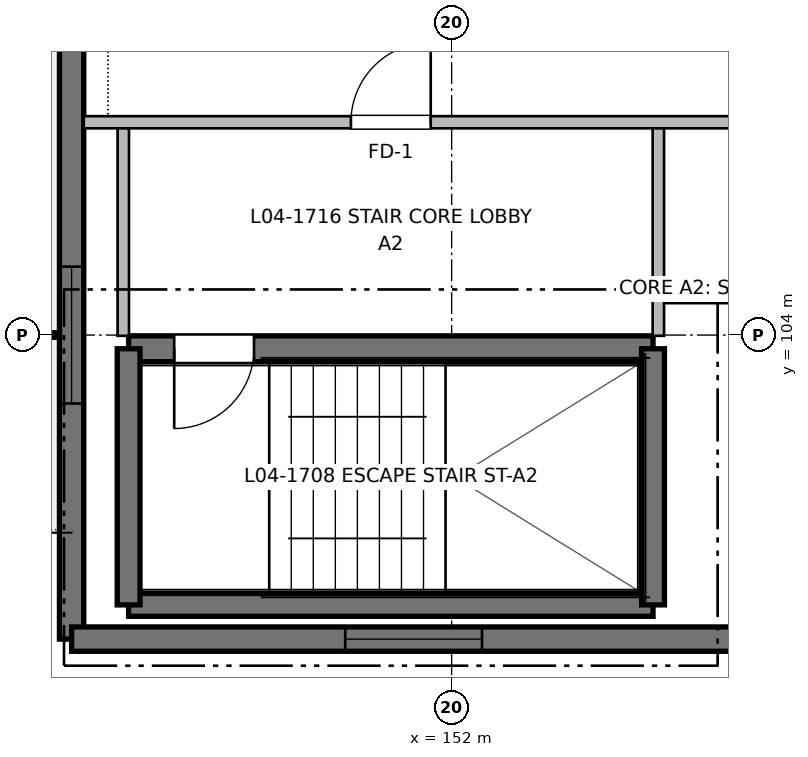
"""IFC4 building model, lengths in metres.
Left out: names, types, materials, properties, quantities, classifications, styles, units other than length and angle.
Written with IfcOpenShell. Run it as: python <this file> out.ifc"""

import sys

from ifc_helpers import new_model, si_unit, direction, frame, frame_2d, origin, place, context, subcontext, project, spatial, rectangle, extrude, element, fill, save


model = new_model("IFC4")
c1 = context("Model", 3, precision=1e-05, world=origin(), true_north=direction((0.0, 1.0)))
c2 = subcontext(c1, "Body", "Model", "MODEL_VIEW")
j1 = project(units=[si_unit("LENGTHUNIT", "METRE"), si_unit("PLANEANGLEUNIT", "RADIAN")], contexts=[c1])
p1 = place(None, origin())
s1 = spatial("IfcSite", under=j1, at=p1, CompositionType="ELEMENT")
p2 = place(p1, origin())
s2 = spatial("IfcBuilding", under=s1, at=p2, CompositionType="ELEMENT")
p3 = place(p2, frame((0.0, 0.0, 13.76)))
s3 = spatial("IfcBuildingStorey", under=s2, at=p3, CompositionType="ELEMENT", Elevation=13.76)
p4 = place(p3, frame((147.75, 100.45, 0.0), z_axis=(0.0, 0.0, 1.0), x_axis=(1.0, 0.0, 0.0)))
e1 = element("IfcWall", 1, at=p4, inside=s3, PredefinedType="SHEAR", context=c2, shape_type="SweptSolid", body=[
    extrude(rectangle(XDim=6.9, YDim=0.3, at=frame_2d((3.45, 0.0))), origin(), (0.0, 0.0, 1.0), 3.2),
])
p5 = place(p3, frame((154.65, 103.82, 0.0), z_axis=(0.0, 0.0, 1.0), x_axis=(-1.0, 0.0, 0.0)))
e2 = element("IfcWall", 2, at=p5, inside=s3, PredefinedType="SHEAR", context=c2, shape_type="SweptSolid", body=[
    extrude(rectangle(XDim=6.9, YDim=0.34, at=frame_2d((3.45, 0.0))), origin(), (0.0, 0.0, 1.0), 3.2),
])
p6 = place(p5, frame((5.25, 0.0, 0.0)))
e3 = element("IfcOpeningElement", 3, at=p6, cuts=e2, PredefinedType="OPENING", context=c2, shape_type="SweptSolid", body=[
    extrude(rectangle(XDim=1.05, YDim=2.15, at=frame_2d((0.525, 1.075))), frame((0.0, 0.18, 0.0), z_axis=(0.0, -1.0, 0.0), x_axis=(1.0, 0.0, 0.0)), (0.0, 0.0, 1.0), 0.36),
])
for number, where, z_axis, x_axis in (
    (4, (147.75, 103.82, 0.0), (0.0, 0.0, 1.0), (0.0, -1.0, 0.0)),
    (5, (154.65, 100.45, 0.0), (0.0, 0.0, 1.0), (0.0, 1.0, 0.0)),
):
    element("IfcWall", number, at=place(p3, frame(where, z_axis=z_axis, x_axis=x_axis)), inside=s3, PredefinedType="SHEAR", context=c2, shape_type="SweptSolid", body=[
        extrude(rectangle(XDim=3.37, YDim=0.3, at=frame_2d((1.685, 0.0))), origin(), (0.0, 0.0, 1.0), 3.2),
    ])
p7 = place(p3, frame((147.0, 100.0, 0.0), z_axis=(0.0, 0.0, 1.0), x_axis=(0.0, 1.0, 0.0)))
e6 = element("IfcWall", 6, at=p7, inside=s3, PredefinedType="SHEAR", context=c2, shape_type="SweptSolid", body=[
    extrude(rectangle(XDim=16.0, YDim=0.32, at=frame_2d((8.0, 0.0))), origin(), (0.0, 0.0, 1.0), 2.98),
])
p8 = place(p7, frame((3.1, 0.0, 0.72)))
e7 = element("IfcOpeningElement", 7, at=p8, cuts=e6, PredefinedType="OPENING", context=c2, shape_type="SweptSolid", body=[
    extrude(rectangle(XDim=1.8, YDim=1.5, at=frame_2d((0.9, 0.75))), frame((0.0, 0.17, 0.0), z_axis=(0.0, -1.0, 0.0), x_axis=(1.0, 0.0, 0.0)), (0.0, 0.0, 1.0), 0.34),
])
p9 = place(p7, frame((11.85, 0.0, 0.0)))
e8 = element("IfcOpeningElement", 8, at=p9, cuts=e6, PredefinedType="OPENING", context=c2, shape_type="SweptSolid", body=[
    extrude(rectangle(XDim=1.2, YDim=2.2, at=frame_2d((0.6, 1.1))), frame((0.0, 0.17, 0.0), z_axis=(0.0, -1.0, 0.0), x_axis=(1.0, 0.0, 0.0)), (0.0, 0.0, 1.0), 0.34),
])
p10 = place(p3, frame((156.0, 100.0, 0.0), z_axis=(0.0, 0.0, 1.0), x_axis=(-1.0, 0.0, 0.0)))
e9 = element("IfcWall", 9, at=p10, inside=s3, PredefinedType="SHEAR", context=c2, shape_type="SweptSolid", body=[
    extrude(rectangle(XDim=9.0, YDim=0.32, at=frame_2d((4.5, 0.0))), origin(), (0.0, 0.0, 1.0), 2.98),
])
p11 = place(p10, frame((3.6, 0.0, 0.72)))
e10 = element("IfcOpeningElement", 10, at=p11, cuts=e9, PredefinedType="OPENING", context=c2, shape_type="SweptSolid", body=[
    extrude(rectangle(XDim=1.8, YDim=1.5, at=frame_2d((0.9, 0.75))), frame((0.0, 0.17, 0.0), z_axis=(0.0, -1.0, 0.0), x_axis=(1.0, 0.0, 0.0)), (0.0, 0.0, 1.0), 0.34),
])
p12 = place(p3, frame((147.16, 106.8, 0.0), z_axis=(0.0, 0.0, 1.0), x_axis=(1.0, 0.0, 0.0)))
e11 = element("IfcWall", 11, at=p12, inside=s3, PredefinedType="PARTITIONING", context=c2, shape_type="SweptSolid", body=[
    extrude(rectangle(XDim=27.64, YDim=0.16, at=frame_2d((13.82, 0.0))), origin(), (0.0, 0.0, 1.0), 2.935),
])
p13 = place(p12, frame((3.515, 0.0, 0.0)))
e12 = element("IfcOpeningElement", 12, at=p13, cuts=e11, PredefinedType="OPENING", context=c2, shape_type="SweptSolid", body=[
    extrude(rectangle(XDim=1.05, YDim=2.15, at=frame_2d((0.525, 1.075))), frame((0.0, 0.09, 0.0), z_axis=(0.0, -1.0, 0.0), x_axis=(1.0, 0.0, 0.0)), (0.0, 0.0, 1.0), 0.18),
])
p14 = place(p12, frame((10.69, 0.0, 0.0)))
e13 = element("IfcOpeningElement", 13, at=p14, cuts=e11, PredefinedType="OPENING", context=c2, shape_type="SweptSolid", body=[
    extrude(rectangle(XDim=0.98, YDim=2.15, at=frame_2d((0.49, 1.075))), frame((0.0, 0.09, 0.0), z_axis=(0.0, -1.0, 0.0), x_axis=(1.0, 0.0, 0.0)), (0.0, 0.0, 1.0), 0.18),
])
for number, where, z_axis, x_axis in (
    (14, (147.68, 103.99, 0.0), (0.0, 0.0, 1.0), (0.0, 1.0, 0.0)),
    (15, (154.72, 103.99, 0.0), (0.0, 0.0, 1.0), (0.0, 1.0, 0.0)),
):
    element("IfcWall", number, at=place(p3, frame(where, z_axis=z_axis, x_axis=x_axis)), inside=s3, PredefinedType="PARTITIONING", context=c2, shape_type="SweptSolid", body=[
        extrude(rectangle(XDim=2.73, YDim=0.15, at=frame_2d((1.365, 0.0))), origin(), (0.0, 0.0, 1.0), 2.935),
    ])
p15 = place(p3, frame((154.8, 104.47, 0.0), z_axis=(0.0, 0.0, 1.0), x_axis=(1.0, 0.0, 0.0)))
e16 = element("IfcWall", 16, at=p15, inside=s3, PredefinedType="PARTITIONING", context=c2, shape_type="SweptSolid", body=[
    extrude(rectangle(XDim=7.02, YDim=0.1, at=frame_2d((3.51, 0.0))), origin(), (0.0, 0.0, 1.0), 2.935),
])
p16 = place(p15, frame((2.974, 0.0, 0.0)))
e17 = element("IfcOpeningElement", 17, at=p16, cuts=e16, PredefinedType="OPENING", context=c2, shape_type="SweptSolid", body=[
    extrude(rectangle(XDim=0.92, YDim=2.1, at=frame_2d((0.46, 1.05))), frame((0.0, 0.06, 0.0), z_axis=(0.0, -1.0, 0.0), x_axis=(1.0, 0.0, 0.0)), (0.0, 0.0, 1.0), 0.12),
])
p17 = place(p6, origin())
e18 = element("IfcDoor", 18, at=p17, inside=s3, OperationType="SINGLE_SWING_RIGHT", PredefinedType="DOOR", context=c2, shape_type="SweptSolid", body=[
    extrude(rectangle(XDim=1.05, YDim=2.15, at=frame_2d((0.525, 1.075))), frame((0.0, 0.025, 0.0), z_axis=(0.0, -1.0, 0.0), x_axis=(1.0, 0.0, 0.0)), (0.0, 0.0, 1.0), 0.05),
])
fill(e3, e18)
p18 = place(p8, origin())
e19 = element("IfcWindow", 19, at=p18, inside=s3, PartitioningType="SINGLE_PANEL", PredefinedType="WINDOW", context=c2, shape_type="SweptSolid", body=[
    extrude(rectangle(XDim=1.8, YDim=1.5, at=frame_2d((0.9, 0.75))), frame((0.0, 0.03, 0.0), z_axis=(0.0, -1.0, 0.0), x_axis=(1.0, 0.0, 0.0)), (0.0, 0.0, 1.0), 0.06),
])
fill(e7, e19)
p19 = place(p11, origin())
e20 = element("IfcWindow", 20, at=p19, inside=s3, PartitioningType="SINGLE_PANEL", PredefinedType="WINDOW", context=c2, shape_type="SweptSolid", body=[
    extrude(rectangle(XDim=1.8, YDim=1.5, at=frame_2d((0.9, 0.75))), frame((0.0, 0.03, 0.0), z_axis=(0.0, -1.0, 0.0), x_axis=(1.0, 0.0, 0.0)), (0.0, 0.0, 1.0), 0.06),
])
fill(e10, e20)
p20 = place(p13, origin())
e21 = element("IfcDoor", 21, at=p20, inside=s3, OperationType="SINGLE_SWING_RIGHT", PredefinedType="DOOR", context=c2, shape_type="SweptSolid", body=[
    extrude(rectangle(XDim=1.05, YDim=2.15, at=frame_2d((0.525, 1.075))), frame((0.0, 0.025, 0.0), z_axis=(0.0, -1.0, 0.0), x_axis=(1.0, 0.0, 0.0)), (0.0, 0.0, 1.0), 0.05),
])
fill(e12, e21)
save(model, sys.argv[1])
